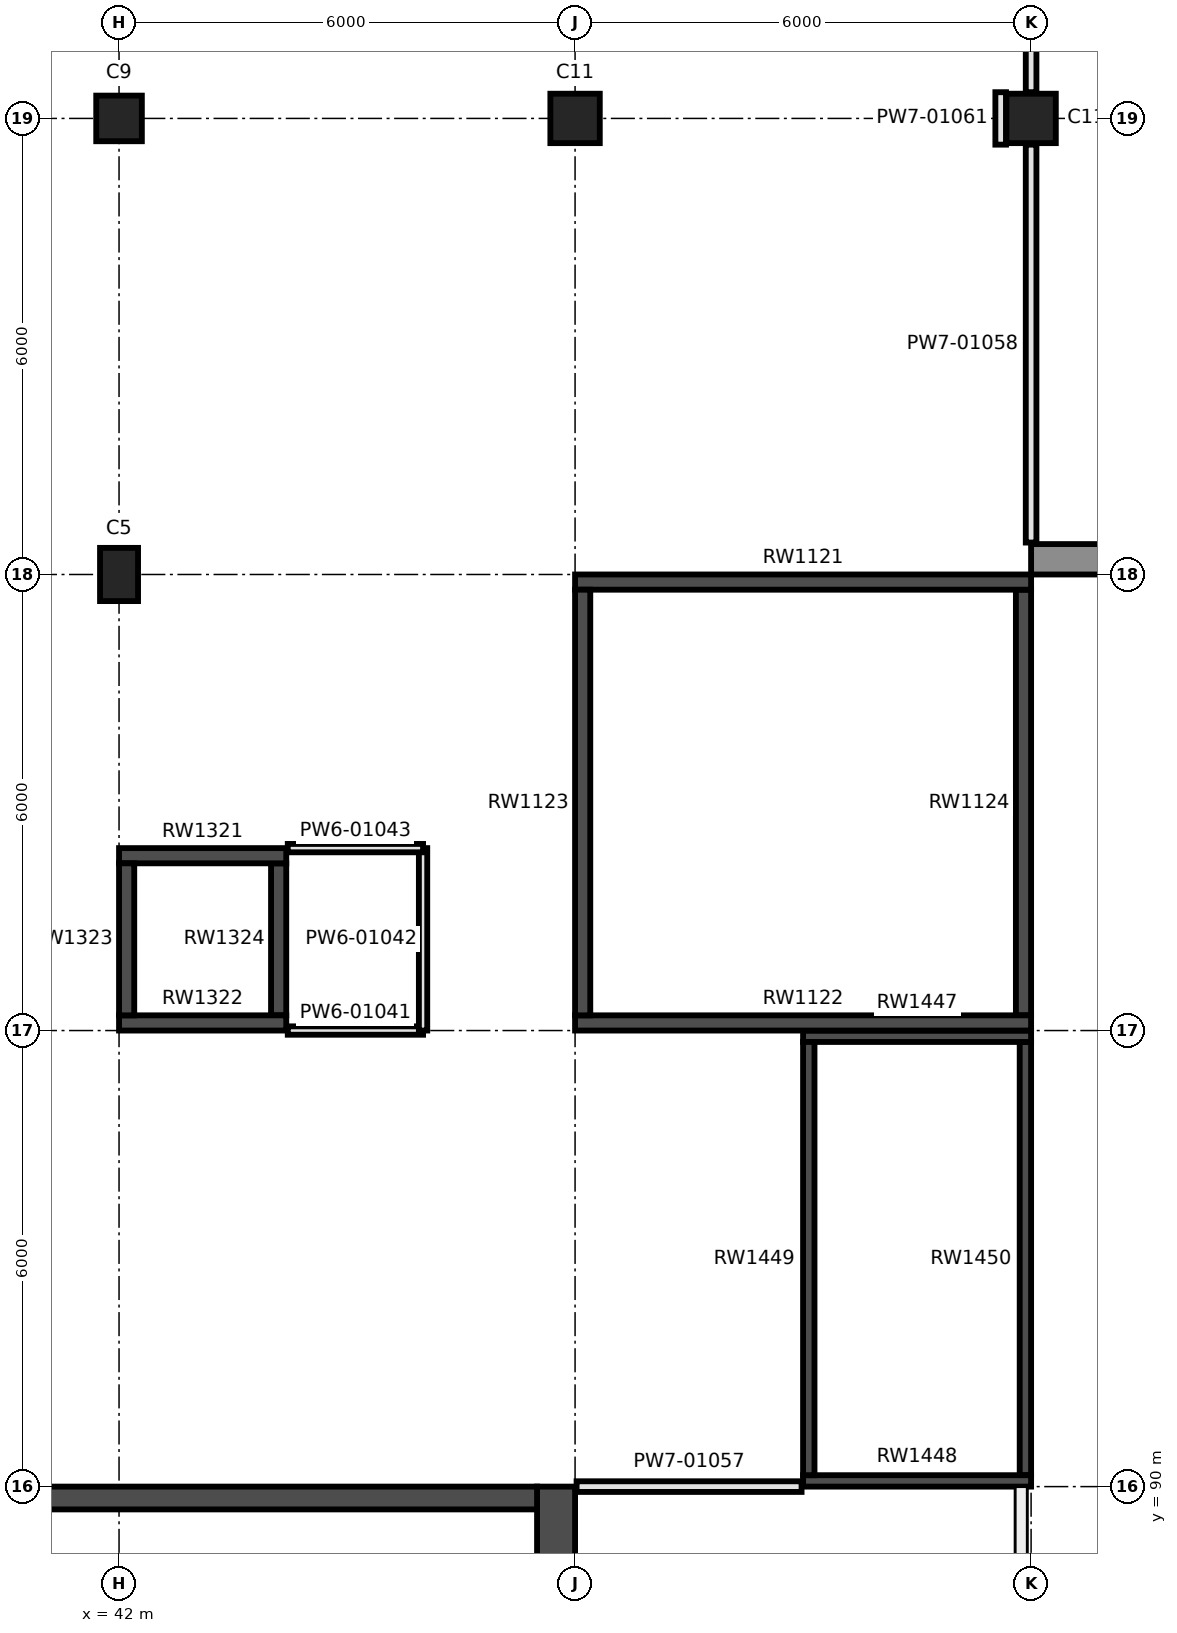
"""IFC4 building model, lengths in metres.
Left out: names, types, materials, properties, quantities, classifications, styles, units other than length and angle.
Written with IfcOpenShell. Run it as: python <this file> out.ifc"""

import sys

from ifc_helpers import new_model, si_unit, direction, frame, frame_2d, origin, origin_2d, place, context, subcontext, project, spatial, rectangle, extrude, element, fill, save


model = new_model("IFC4")
c1 = context("Model", 3, precision=1e-05, world=origin(), true_north=direction((0.0, 1.0)))
c2 = subcontext(c1, "Body", "Model", "MODEL_VIEW")
j1 = project(units=[si_unit("LENGTHUNIT", "METRE"), si_unit("PLANEANGLEUNIT", "RADIAN")], contexts=[c1])
p1 = place(None, origin())
s1 = spatial("IfcSite", under=j1, at=p1, CompositionType="ELEMENT")
p2 = place(p1, origin())
s2 = spatial("IfcBuilding", under=s1, at=p2, CompositionType="ELEMENT")
p3 = place(p2, frame((0.0, 0.0, 7.0)))
s3 = spatial("IfcBuildingStorey", under=s2, at=p3, CompositionType="ELEMENT", Elevation=7.0)
p4 = place(p3, frame((42.0, 102.0, 0.0), z_axis=(0.0, 0.0, 1.0), x_axis=(1.0, 0.0, 0.0)))
e1 = element("IfcColumn", 1, at=p4, inside=s3, PredefinedType="COLUMN", context=c2, shape_type="SweptSolid", body=[
    extrude(rectangle(XDim=0.5, YDim=0.7, at=origin_2d()), origin(), (0.0, 0.0, 1.0), 5.0),
])
p5 = place(p3, frame((42.0, 108.0, 0.0), z_axis=(0.0, 0.0, 1.0), x_axis=(1.0, 0.0, 0.0)))
e2 = element("IfcColumn", 2, at=p5, inside=s3, PredefinedType="COLUMN", context=c2, shape_type="SweptSolid", body=[
    extrude(rectangle(XDim=0.6, YDim=0.6, at=origin_2d()), origin(), (0.0, 0.0, 1.0), 5.0),
])
for number, where, z_axis, x_axis in (
    (3, (48.0, 108.0, 0.0), (0.0, 0.0, 1.0), (1.0, 0.0, 0.0)),
    (4, (54.0, 108.0, 0.0), (0.0, 0.0, 1.0), (1.0, 0.0, 0.0)),
):
    element("IfcColumn", number, at=place(p3, frame(where, z_axis=z_axis, x_axis=x_axis)), inside=s3, PredefinedType="COLUMN", context=c2, shape_type="SweptSolid", body=[
        extrude(rectangle(XDim=0.65, YDim=0.65, at=origin_2d()), origin(), (0.0, 0.0, 1.0), 5.0),
    ])
p6 = place(p3, frame((48.0, 101.9, 0.0), z_axis=(0.0, 0.0, 1.0), x_axis=(1.0, 0.0, 0.0)))
e5 = element("IfcWall", 5, at=p6, inside=s3, PredefinedType="SHEAR", context=c2, shape_type="SweptSolid", body=[
    extrude(rectangle(XDim=6.0, YDim=0.2, at=frame_2d((3.0, 0.0))), origin(), (0.0, 0.0, 1.0), 5.0),
])
p7 = place(p6, frame((2.1, 0.0, 0.0)))
e6 = element("IfcOpeningElement", 6, at=p7, cuts=e5, PredefinedType="OPENING", context=c2, shape_type="SweptSolid", body=[
    extrude(rectangle(XDim=1.8, YDim=2.2, at=frame_2d((0.9, 1.1))), frame((0.0, 0.11, 0.0), z_axis=(0.0, -1.0, 0.0), x_axis=(1.0, 0.0, 0.0)), (0.0, 0.0, 1.0), 0.22),
])
p8 = place(p3, frame((48.0, 96.1, 0.0), z_axis=(0.0, 0.0, 1.0), x_axis=(1.0, 0.0, 0.0)))
e7 = element("IfcWall", 7, at=p8, inside=s3, PredefinedType="SHEAR", context=c2, shape_type="SweptSolid", body=[
    extrude(rectangle(XDim=6.0, YDim=0.2, at=frame_2d((3.0, 0.0))), origin(), (0.0, 0.0, 1.0), 5.0),
])
p9 = place(p3, frame((48.1, 96.2, 0.0), z_axis=(0.0, 0.0, 1.0), x_axis=(0.0, 1.0, 0.0)))
e8 = element("IfcWall", 8, at=p9, inside=s3, PredefinedType="SHEAR", context=c2, shape_type="SweptSolid", body=[
    extrude(rectangle(XDim=5.6, YDim=0.2, at=frame_2d((2.8, 0.0))), origin(), (0.0, 0.0, 1.0), 5.0),
])
p10 = place(p9, frame((4.4, 0.0, 0.0)))
e9 = element("IfcOpeningElement", 9, at=p10, cuts=e8, PredefinedType="OPENING", context=c2, shape_type="SweptSolid", body=[
    extrude(rectangle(XDim=1.1, YDim=2.2, at=frame_2d((0.55, 1.1))), frame((0.0, 0.11, 0.0), z_axis=(0.0, -1.0, 0.0), x_axis=(1.0, 0.0, 0.0)), (0.0, 0.0, 1.0), 0.22),
])
p11 = place(p3, frame((53.9, 96.2, 0.0), z_axis=(0.0, 0.0, 1.0), x_axis=(0.0, 1.0, 0.0)))
e10 = element("IfcWall", 10, at=p11, inside=s3, PredefinedType="SHEAR", context=c2, shape_type="SweptSolid", body=[
    extrude(rectangle(XDim=5.6, YDim=0.2, at=frame_2d((2.8, 0.0))), origin(), (0.0, 0.0, 1.0), 5.0),
])
p12 = place(p11, frame((2.55, 0.0, 0.9)))
e11 = element("IfcOpeningElement", 11, at=p12, cuts=e10, PredefinedType="OPENING", context=c2, shape_type="SweptSolid", body=[
    extrude(rectangle(XDim=0.5, YDim=2.1, at=frame_2d((0.25, 1.05))), frame((0.0, 0.11, 0.0), z_axis=(0.0, -1.0, 0.0), x_axis=(1.0, 0.0, 0.0)), (0.0, 0.0, 1.0), 0.22),
])
p13 = place(p3, frame((42.0, 98.3, 0.0), z_axis=(0.0, 0.0, 1.0), x_axis=(1.0, 0.0, 0.0)))
e12 = element("IfcWall", 12, at=p13, inside=s3, PredefinedType="SHEAR", context=c2, shape_type="SweptSolid", body=[
    extrude(rectangle(XDim=2.2, YDim=0.2, at=frame_2d((1.1, 0.0))), origin(), (0.0, 0.0, 1.0), 5.0),
])
p14 = place(p13, frame((0.55, 0.0, 0.0)))
e13 = element("IfcOpeningElement", 13, at=p14, cuts=e12, PredefinedType="OPENING", context=c2, shape_type="SweptSolid", body=[
    extrude(rectangle(XDim=1.1, YDim=2.1, at=frame_2d((0.55, 1.05))), frame((0.0, 0.11, 0.0), z_axis=(0.0, -1.0, 0.0), x_axis=(1.0, 0.0, 0.0)), (0.0, 0.0, 1.0), 0.22),
])
p15 = place(p3, frame((42.0, 96.1, 0.0), z_axis=(0.0, 0.0, 1.0), x_axis=(1.0, 0.0, 0.0)))
e14 = element("IfcWall", 14, at=p15, inside=s3, PredefinedType="SHEAR", context=c2, shape_type="SweptSolid", body=[
    extrude(rectangle(XDim=2.2, YDim=0.2, at=frame_2d((1.1, 0.0))), origin(), (0.0, 0.0, 1.0), 5.0),
])
for number, where, z_axis, x_axis in (
    (15, (42.1, 96.2, 0.0), (0.0, 0.0, 1.0), (0.0, 1.0, 0.0)),
    (16, (44.1, 96.2, 0.0), (0.0, 0.0, 1.0), (0.0, 1.0, 0.0)),
):
    element("IfcWall", number, at=place(p3, frame(where, z_axis=z_axis, x_axis=x_axis)), inside=s3, PredefinedType="SHEAR", context=c2, shape_type="SweptSolid", body=[
        extrude(rectangle(XDim=2.0, YDim=0.2, at=frame_2d((1.0, 0.0))), origin(), (0.0, 0.0, 1.0), 5.0),
    ])
for number, where, z_axis, x_axis in (
    (17, (51.0, 95.925, 0.0), (0.0, 0.0, 1.0), (1.0, 0.0, 0.0)),
    (18, (51.0, 90.075, 0.0), (0.0, 0.0, 1.0), (1.0, 0.0, 0.0)),
):
    element("IfcWall", number, at=place(p3, frame(where, z_axis=z_axis, x_axis=x_axis)), inside=s3, PredefinedType="SHEAR", context=c2, shape_type="SweptSolid", body=[
        extrude(rectangle(XDim=3.0, YDim=0.15, at=frame_2d((1.5, 0.0))), origin(), (0.0, 0.0, 1.0), 5.0),
    ])
for number, where, z_axis, x_axis in (
    (19, (51.075, 90.15, 0.0), (0.0, 0.0, 1.0), (0.0, 1.0, 0.0)),
    (20, (53.925, 90.15, 0.0), (0.0, 0.0, 1.0), (0.0, 1.0, 0.0)),
):
    element("IfcWall", number, at=place(p3, frame(where, z_axis=z_axis, x_axis=x_axis)), inside=s3, PredefinedType="SHEAR", context=c2, shape_type="SweptSolid", body=[
        extrude(rectangle(XDim=5.7, YDim=0.15, at=frame_2d((2.85, 0.0))), origin(), (0.0, 0.0, 1.0), 5.0),
    ])
p16 = place(p3, frame((47.75, 54.5, 0.0), z_axis=(0.0, 0.0, 1.0), x_axis=(0.0, 1.0, 0.0)))
e21 = element("IfcWall", 21, at=p16, inside=s3, PredefinedType="SHEAR", context=c2, shape_type="SweptSolid", body=[
    extrude(rectangle(XDim=35.5, YDim=0.5, at=frame_2d((17.75, 0.0))), origin(), (0.0, 0.0, 1.0), 5.0),
])
p17 = place(p16, frame((18.2, 0.0, 0.0)))
e22 = element("IfcOpeningElement", 22, at=p17, cuts=e21, PredefinedType="OPENING", context=c2, shape_type="SweptSolid", body=[
    extrude(rectangle(XDim=1.8, YDim=2.4, at=frame_2d((0.9, 1.2))), frame((0.0, 0.26, 0.0), z_axis=(0.0, -1.0, 0.0), x_axis=(1.0, 0.0, 0.0)), (0.0, 0.0, 1.0), 0.52),
])
p18 = place(p16, frame((21.0, 0.0, 0.0)))
e23 = element("IfcOpeningElement", 23, at=p18, cuts=e21, PredefinedType="OPENING", context=c2, shape_type="SweptSolid", body=[
    extrude(rectangle(XDim=1.8, YDim=2.4, at=frame_2d((0.9, 1.2))), frame((0.0, 0.26, 0.0), z_axis=(0.0, -1.0, 0.0), x_axis=(1.0, 0.0, 0.0)), (0.0, 0.0, 1.0), 0.52),
])
p19 = place(p3, frame((18.5, 89.85, 0.0), z_axis=(0.0, 0.0, 1.0), x_axis=(1.0, 0.0, 0.0)))
e24 = element("IfcWall", 24, at=p19, inside=s3, PredefinedType="SHEAR", context=c2, shape_type="SweptSolid", body=[
    extrude(rectangle(XDim=29.0, YDim=0.3, at=frame_2d((14.5, 0.0))), origin(), (0.0, 0.0, 1.0), 5.0),
])
p20 = place(p3, frame((60.0, 102.2, 0.0), z_axis=(0.0, 0.0, 1.0), x_axis=(-1.0, 0.0, 0.0)))
e25 = element("IfcWall", 25, at=p20, inside=s3, PredefinedType="SOLIDWALL", context=c2, shape_type="SweptSolid", body=[
    extrude(rectangle(XDim=6.0, YDim=0.4, at=frame_2d((3.0, 0.0))), origin(), (0.0, 0.0, 1.0), 4.05),
])
p21 = place(p20, frame((1.8, 0.0, 0.9)))
e26 = element("IfcOpeningElement", 26, at=p21, cuts=e25, PredefinedType="OPENING", context=c2, shape_type="SweptSolid", body=[
    extrude(rectangle(XDim=2.4, YDim=2.95, at=frame_2d((1.2, 1.475))), frame((0.0, 0.21, 0.0), z_axis=(0.0, -1.0, 0.0), x_axis=(1.0, 0.0, 0.0)), (0.0, 0.0, 1.0), 0.42),
])
p22 = place(p3, frame((44.22, 96.0, 0.0), z_axis=(0.0, 0.0, 1.0), x_axis=(1.0, 0.0, 0.0)))
e27 = element("IfcWall", 27, at=p22, inside=s3, PredefinedType="PARTITIONING", context=c2, shape_type="SweptSolid", body=[
    extrude(rectangle(XDim=1.78, YDim=0.11, at=frame_2d((0.89, 0.0))), origin(), (0.0, 0.0, 1.0), 4.15),
])
p23 = place(p3, frame((46.0, 96.0, 0.0), z_axis=(0.0, 0.0, 1.0), x_axis=(0.0, 1.0, 0.0)))
e28 = element("IfcWall", 28, at=p23, inside=s3, PredefinedType="PARTITIONING", context=c2, shape_type="SweptSolid", body=[
    extrude(rectangle(XDim=2.4, YDim=0.11, at=frame_2d((1.2, 0.0))), origin(), (0.0, 0.0, 1.0), 4.15),
])
p24 = place(p23, frame((0.85, 0.0, 0.0)))
e29 = element("IfcOpeningElement", 29, at=p24, cuts=e28, PredefinedType="OPENING", context=c2, shape_type="SweptSolid", body=[
    extrude(rectangle(XDim=0.75, YDim=2.04, at=frame_2d((0.375, 1.02))), frame((0.0, 0.065, 0.0), z_axis=(0.0, -1.0, 0.0), x_axis=(1.0, 0.0, 0.0)), (0.0, 0.0, 1.0), 0.13),
])
p25 = place(p3, frame((44.22, 98.4, 0.0), z_axis=(0.0, 0.0, 1.0), x_axis=(1.0, 0.0, 0.0)))
e30 = element("IfcWall", 30, at=p25, inside=s3, PredefinedType="PARTITIONING", context=c2, shape_type="SweptSolid", body=[
    extrude(rectangle(XDim=1.78, YDim=0.11, at=frame_2d((0.89, 0.0))), origin(), (0.0, 0.0, 1.0), 4.75),
])
p26 = place(p3, frame((48.02, 90.0, 0.0), z_axis=(0.0, 0.0, 1.0), x_axis=(1.0, 0.0, 0.0)))
e31 = element("IfcWall", 31, at=p26, inside=s3, PredefinedType="PARTITIONING", context=c2, shape_type="SweptSolid", body=[
    extrude(rectangle(XDim=2.96, YDim=0.14, at=frame_2d((1.48, 0.0))), origin(), (0.0, 0.0, 1.0), 4.15),
])
p27 = place(p26, frame((0.53, 0.0, 0.0)))
e32 = element("IfcOpeningElement", 32, at=p27, cuts=e31, PredefinedType="OPENING", context=c2, shape_type="SweptSolid", body=[
    extrude(rectangle(XDim=1.8, YDim=2.1, at=frame_2d((0.9, 1.05))), frame((0.0, 0.08, 0.0), z_axis=(0.0, -1.0, 0.0), x_axis=(1.0, 0.0, 0.0)), (0.0, 0.0, 1.0), 0.16),
])
p28 = place(p3, frame((54.0, 102.42, 0.0), z_axis=(0.0, 0.0, 1.0), x_axis=(0.0, 1.0, 0.0)))
e33 = element("IfcWall", 33, at=p28, inside=s3, PredefinedType="PARTITIONING", context=c2, shape_type="SweptSolid", body=[
    extrude(rectangle(XDim=5.235, YDim=0.14, at=frame_2d((2.618, 0.0))), origin(), (0.0, 0.0, 1.0), 4.15),
])
p29 = place(p28, frame((1.63, 0.0, 0.0)))
e34 = element("IfcOpeningElement", 34, at=p29, cuts=e33, PredefinedType="OPENING", context=c2, shape_type="SweptSolid", body=[
    extrude(rectangle(XDim=1.8, YDim=2.1, at=frame_2d((0.9, 1.05))), frame((0.0, 0.08, 0.0), z_axis=(0.0, -1.0, 0.0), x_axis=(1.0, 0.0, 0.0)), (0.0, 0.0, 1.0), 0.16),
])
p30 = place(p3, frame((54.0, 108.345, 0.0), z_axis=(0.0, 0.0, 1.0), x_axis=(0.0, 1.0, 0.0)))
e35 = element("IfcWall", 35, at=p30, inside=s3, PredefinedType="PARTITIONING", context=c2, shape_type="SweptSolid", body=[
    extrude(rectangle(XDim=5.31, YDim=0.14, at=frame_2d((2.655, 0.0))), origin(), (0.0, 0.0, 1.0), 4.05),
])
p31 = place(p30, frame((0.205, 0.0, 0.0)))
e36 = element("IfcOpeningElement", 36, at=p31, cuts=e35, PredefinedType="OPENING", context=c2, shape_type="SweptSolid", body=[
    extrude(rectangle(XDim=1.8, YDim=2.1, at=frame_2d((0.9, 1.05))), frame((0.0, 0.08, 0.0), z_axis=(0.0, -1.0, 0.0), x_axis=(1.0, 0.0, 0.0)), (0.0, 0.0, 1.0), 0.16),
])
p32 = place(p3, frame((53.6, 107.655, 0.0), z_axis=(0.0, 0.0, 1.0), x_axis=(0.0, 1.0, 0.0)))
e37 = element("IfcWall", 37, at=p32, inside=s3, PredefinedType="PARTITIONING", context=c2, shape_type="SweptSolid", body=[
    extrude(rectangle(XDim=0.69, YDim=0.14, at=frame_2d((0.345, 0.0))), origin(), (0.0, 0.0, 1.0), 4.05),
])
p33 = place(p12, origin())
e38 = element("IfcWindow", 38, at=p33, inside=s3, PartitioningType="SINGLE_PANEL", PredefinedType="WINDOW", context=c2, shape_type="SweptSolid", body=[
    extrude(rectangle(XDim=0.5, YDim=2.1, at=frame_2d((0.25, 1.05))), frame((0.0, 0.03, 0.0), z_axis=(0.0, -1.0, 0.0), x_axis=(1.0, 0.0, 0.0)), (0.0, 0.0, 1.0), 0.06),
])
fill(e11, e38)
p34 = place(p7, frame((1.8, 0.0, 0.0), z_axis=(0.0, 0.0, 1.0), x_axis=(-1.0, 0.0, 0.0)))
e39 = element("IfcDoor", 39, at=p34, inside=s3, OperationType="DOUBLE_DOOR_SINGLE_SWING", PredefinedType="DOOR", context=c2, shape_type="SweptSolid", body=[
    extrude(rectangle(XDim=1.8, YDim=2.2, at=frame_2d((0.9, 1.1))), frame((0.0, 0.025, 0.0), z_axis=(0.0, -1.0, 0.0), x_axis=(1.0, 0.0, 0.0)), (0.0, 0.0, 1.0), 0.05),
])
fill(e6, e39)
p35 = place(p10, frame((1.1, 0.0, 0.0), z_axis=(0.0, 0.0, 1.0), x_axis=(-1.0, 0.0, 0.0)))
e40 = element("IfcDoor", 40, at=p35, inside=s3, OperationType="SINGLE_SWING_RIGHT", PredefinedType="DOOR", context=c2, shape_type="SweptSolid", body=[
    extrude(rectangle(XDim=1.1, YDim=2.2, at=frame_2d((0.55, 1.1))), frame((0.0, 0.025, 0.0), z_axis=(0.0, -1.0, 0.0), x_axis=(1.0, 0.0, 0.0)), (0.0, 0.0, 1.0), 0.05),
])
fill(e9, e40)
p36 = place(p24, origin())
e41 = element("IfcDoor", 41, at=p36, inside=s3, OperationType="SINGLE_SWING_LEFT", PredefinedType="DOOR", context=c2, shape_type="SweptSolid", body=[
    extrude(rectangle(XDim=0.75, YDim=2.04, at=frame_2d((0.375, 1.02))), frame((0.0, 0.025, 0.0), z_axis=(0.0, -1.0, 0.0), x_axis=(1.0, 0.0, 0.0)), (0.0, 0.0, 1.0), 0.05),
])
fill(e29, e41)
p37 = place(p29, origin())
e42 = element("IfcDoor", 42, at=p37, inside=s3, OperationType="DOUBLE_DOOR_SINGLE_SWING", PredefinedType="DOOR", context=c2, shape_type="SweptSolid", body=[
    extrude(rectangle(XDim=1.8, YDim=2.1, at=frame_2d((0.9, 1.05))), frame((0.0, 0.025, 0.0), z_axis=(0.0, -1.0, 0.0), x_axis=(1.0, 0.0, 0.0)), (0.0, 0.0, 1.0), 0.05),
])
fill(e34, e42)
p38 = place(p31, origin())
e43 = element("IfcDoor", 43, at=p38, inside=s3, OperationType="DOUBLE_DOOR_SINGLE_SWING", PredefinedType="DOOR", context=c2, shape_type="SweptSolid", body=[
    extrude(rectangle(XDim=1.8, YDim=2.1, at=frame_2d((0.9, 1.05))), frame((0.0, 0.025, 0.0), z_axis=(0.0, -1.0, 0.0), x_axis=(1.0, 0.0, 0.0)), (0.0, 0.0, 1.0), 0.05),
])
fill(e36, e43)
p39 = place(p27, frame((1.8, 0.0, 0.0), z_axis=(0.0, 0.0, 1.0), x_axis=(-1.0, 0.0, 0.0)))
e44 = element("IfcDoor", 44, at=p39, inside=s3, OperationType="DOUBLE_DOOR_SINGLE_SWING", PredefinedType="DOOR", context=c2, shape_type="SweptSolid", body=[
    extrude(rectangle(XDim=1.8, YDim=2.1, at=frame_2d((0.9, 1.05))), frame((0.0, 0.025, 0.0), z_axis=(0.0, -1.0, 0.0), x_axis=(1.0, 0.0, 0.0)), (0.0, 0.0, 1.0), 0.05),
])
fill(e32, e44)
p40 = place(p14, origin())
e45 = element("IfcDoor", 45, at=p40, inside=s3, OperationType="DOUBLE_DOOR_SLIDING", PredefinedType="DOOR", context=c2, shape_type="SweptSolid", body=[
    extrude(rectangle(XDim=1.1, YDim=2.1, at=frame_2d((0.55, 1.05))), frame((0.0, 0.025, 0.0), z_axis=(0.0, -1.0, 0.0), x_axis=(1.0, 0.0, 0.0)), (0.0, 0.0, 1.0), 0.05),
])
fill(e13, e45)
save(model, sys.argv[1])
